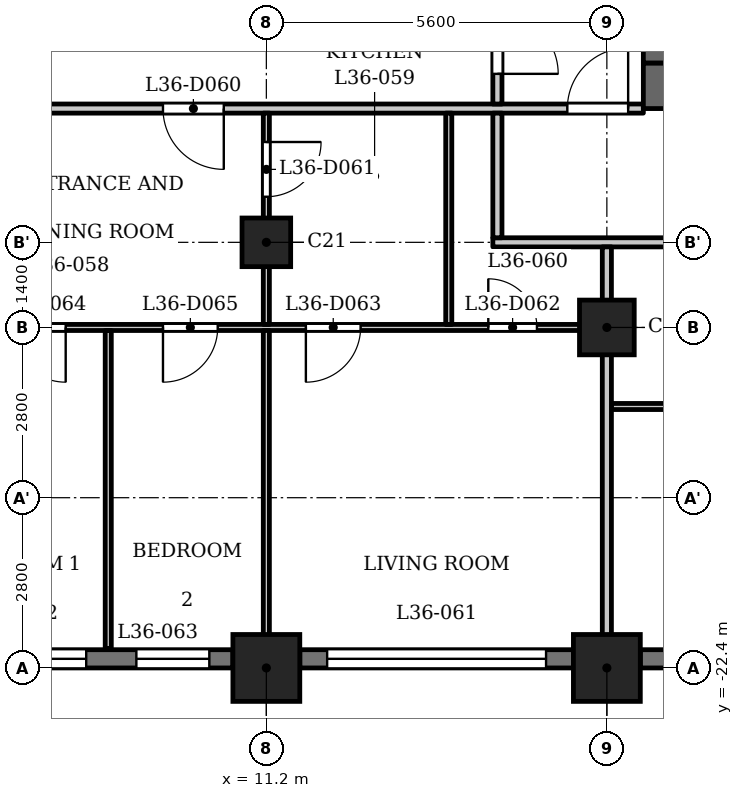
"""IFC4 building model, lengths in metres.
Left out: names, types, materials, properties, quantities, classifications, styles, units other than length and angle.
Written with IfcOpenShell. Run it as: python <this file> out.ifc"""

import sys

from ifc_helpers import new_model, si_unit, direction, frame, frame_2d, origin, origin_2d, place, context, subcontext, project, spatial, rectangle, extrude, element, fill, save


model = new_model("IFC4")
c1 = context("Model", 3, precision=1e-05, world=origin(), true_north=direction((0.0, 1.0)))
c2 = subcontext(c1, "Body", "Model", "MODEL_VIEW")
j1 = project(units=[si_unit("LENGTHUNIT", "METRE"), si_unit("PLANEANGLEUNIT", "RADIAN")], contexts=[c1])
p1 = place(None, origin())
s1 = spatial("IfcSite", under=j1, at=p1, CompositionType="ELEMENT")
p2 = place(p1, origin())
s2 = spatial("IfcBuilding", under=s1, at=p2, CompositionType="ELEMENT")
p3 = place(p2, frame((0.0, 0.0, 143.1)))
s3 = spatial("IfcBuildingStorey", under=s2, at=p3, CompositionType="ELEMENT", Elevation=143.1)
for number, where, z_axis, x_axis in (
    (1, (11.2, -22.4, 0.0), (0.0, 0.0, 1.0), (1.0, 0.0, 0.0)),
    (2, (16.8, -22.4, 0.0), (0.0, 0.0, 1.0), (1.0, 0.0, 0.0)),
):
    element("IfcColumn", number, at=place(p3, frame(where, z_axis=z_axis, x_axis=x_axis)), inside=s3, PredefinedType="COLUMN", context=c2, shape_type="SweptSolid", body=[
        extrude(rectangle(XDim=1.1, YDim=1.1, at=origin_2d()), origin(), (0.0, 0.0, 1.0), 3.5),
    ])
p4 = place(p3, frame((16.8, -16.8, 0.0), z_axis=(0.0, 0.0, 1.0), x_axis=(1.0, 0.0, 0.0)))
e3 = element("IfcColumn", 3, at=p4, inside=s3, PredefinedType="COLUMN", context=c2, shape_type="SweptSolid", body=[
    extrude(rectangle(XDim=0.9, YDim=0.9, at=origin_2d()), origin(), (0.0, 0.0, 1.0), 3.5),
])
p5 = place(p3, frame((11.2, -15.4, 0.0), z_axis=(0.0, 0.0, 1.0), x_axis=(1.0, 0.0, 0.0)))
e4 = element("IfcColumn", 4, at=p5, inside=s3, PredefinedType="COLUMN", context=c2, shape_type="SweptSolid", body=[
    extrude(rectangle(XDim=0.8, YDim=0.8, at=origin_2d()), origin(), (0.0, 0.0, 1.0), 3.5),
])
p6 = place(p3, frame((6.15, -22.25, 0.0), z_axis=(0.0, 0.0, 1.0), x_axis=(1.0, 0.0, 0.0)))
e5 = element("IfcWall", 5, at=p6, inside=s3, PredefinedType="SOLIDWALL", context=c2, shape_type="SweptSolid", body=[
    extrude(rectangle(XDim=4.5, YDim=0.3, at=frame_2d((2.25, 0.0))), origin(), (0.0, 0.0, 1.0), 2.45),
])
p7 = place(p6, frame((0.288, 0.0, 0.9)))
e6 = element("IfcOpeningElement", 6, at=p7, cuts=e5, PredefinedType="OPENING", context=c2, shape_type="SweptSolid", body=[
    extrude(rectangle(XDim=1.8, YDim=1.25, at=frame_2d((0.9, 0.625))), frame((0.0, 0.16, 0.0), z_axis=(0.0, -1.0, 0.0), x_axis=(1.0, 0.0, 0.0)), (0.0, 0.0, 1.0), 0.32),
])
p8 = place(p6, frame((2.913, 0.0, 0.6)))
e7 = element("IfcOpeningElement", 7, at=p8, cuts=e5, PredefinedType="OPENING", context=c2, shape_type="SweptSolid", body=[
    extrude(rectangle(XDim=1.2, YDim=1.55, at=frame_2d((0.6, 0.775))), frame((0.0, 0.16, 0.0), z_axis=(0.0, -1.0, 0.0), x_axis=(1.0, 0.0, 0.0)), (0.0, 0.0, 1.0), 0.32),
])
p9 = place(p3, frame((11.75, -22.25, 0.0), z_axis=(0.0, 0.0, 1.0), x_axis=(1.0, 0.0, 0.0)))
e8 = element("IfcWall", 8, at=p9, inside=s3, PredefinedType="SOLIDWALL", context=c2, shape_type="SweptSolid", body=[
    extrude(rectangle(XDim=4.5, YDim=0.3, at=frame_2d((2.25, 0.0))), origin(), (0.0, 0.0, 1.0), 2.45),
])
p10 = place(p9, frame((0.45, 0.0, 1.2)))
e9 = element("IfcOpeningElement", 9, at=p10, cuts=e8, PredefinedType="OPENING", context=c2, shape_type="SweptSolid", body=[
    extrude(rectangle(XDim=3.6, YDim=0.95, at=frame_2d((1.8, 0.475))), frame((0.0, 0.16, 0.0), z_axis=(0.0, -1.0, 0.0), x_axis=(1.0, 0.0, 0.0)), (0.0, 0.0, 1.0), 0.32),
])
p11 = place(p3, frame((17.35, -22.25, 0.0), z_axis=(0.0, 0.0, 1.0), x_axis=(1.0, 0.0, 0.0)))
e10 = element("IfcWall", 10, at=p11, inside=s3, PredefinedType="SOLIDWALL", context=c2, shape_type="SweptSolid", body=[
    extrude(rectangle(XDim=2.65, YDim=0.3, at=frame_2d((1.325, 0.0))), origin(), (0.0, 0.0, 1.0), 2.45),
])
p12 = place(p11, frame((0.425, 0.0, 0.9)))
e11 = element("IfcOpeningElement", 11, at=p12, cuts=e10, PredefinedType="OPENING", context=c2, shape_type="SweptSolid", body=[
    extrude(rectangle(XDim=1.8, YDim=1.25, at=frame_2d((0.9, 0.625))), frame((0.0, 0.16, 0.0), z_axis=(0.0, -1.0, 0.0), x_axis=(1.0, 0.0, 0.0)), (0.0, 0.0, 1.0), 0.32),
])
p13 = place(p3, frame((17.4, -12.825, 0.0), z_axis=(0.0, 0.0, 1.0), x_axis=(1.0, 0.0, 0.0)))
e12 = element("IfcWall", 12, at=p13, inside=s3, PredefinedType="SHEAR", context=c2, shape_type="SweptSolid", body=[
    extrude(rectangle(XDim=10.4, YDim=0.75, at=frame_2d((5.2, 0.0))), origin(), (0.0, 0.0, 1.0), 3.2),
])
p14 = place(p3, frame((17.6, -12.45, 0.0), z_axis=(0.0, 0.0, 1.0), x_axis=(0.0, 1.0, 0.0)))
e13 = element("IfcWall", 13, at=p14, inside=s3, PredefinedType="SHEAR", context=c2, shape_type="SweptSolid", body=[
    extrude(rectangle(XDim=24.9, YDim=0.4, at=frame_2d((12.45, 0.0))), origin(), (0.0, 0.0, 1.0), 3.2),
])
p15 = place(p14, frame((8.65, 0.0, 0.0)))
e14 = element("IfcOpeningElement", 14, at=p15, cuts=e13, PredefinedType="OPENING", context=c2, shape_type="SweptSolid", body=[
    extrude(rectangle(XDim=0.9, YDim=2.1, at=frame_2d((0.45, 1.05))), frame((0.0, 0.21, 0.0), z_axis=(0.0, -1.0, 0.0), x_axis=(1.0, 0.0, 0.0)), (0.0, 0.0, 1.0), 0.42),
])
p16 = place(p14, frame((15.6, 0.0, 0.0)))
e15 = element("IfcOpeningElement", 15, at=p16, cuts=e13, PredefinedType="OPENING", context=c2, shape_type="SweptSolid", body=[
    extrude(rectangle(XDim=1.1, YDim=2.1, at=frame_2d((0.55, 1.05))), frame((0.0, 0.21, 0.0), z_axis=(0.0, -1.0, 0.0), x_axis=(1.0, 0.0, 0.0)), (0.0, 0.0, 1.0), 0.42),
])
p17 = place(p14, frame((18.0, 0.0, 0.0)))
e16 = element("IfcOpeningElement", 16, at=p17, cuts=e13, PredefinedType="OPENING", context=c2, shape_type="SweptSolid", body=[
    extrude(rectangle(XDim=1.1, YDim=2.1, at=frame_2d((0.55, 1.05))), frame((0.0, 0.21, 0.0), z_axis=(0.0, -1.0, 0.0), x_axis=(1.0, 0.0, 0.0)), (0.0, 0.0, 1.0), 0.42),
])
p18 = place(p14, frame((23.025, 0.0, 0.0)))
e17 = element("IfcOpeningElement", 17, at=p18, cuts=e13, PredefinedType="OPENING", context=c2, shape_type="SweptSolid", body=[
    extrude(rectangle(XDim=1.1, YDim=2.1, at=frame_2d((0.55, 1.05))), frame((0.0, 0.21, 0.0), z_axis=(0.0, -1.0, 0.0), x_axis=(1.0, 0.0, 0.0)), (0.0, 0.0, 1.0), 0.42),
])
p19 = place(p14, frame((0.775, 0.0, 0.0)))
e18 = element("IfcOpeningElement", 18, at=p19, cuts=e13, PredefinedType="OPENING", context=c2, shape_type="SweptSolid", body=[
    extrude(rectangle(XDim=1.1, YDim=2.1, at=frame_2d((0.55, 1.05))), frame((0.0, 0.21, 0.0), z_axis=(0.0, -1.0, 0.0), x_axis=(1.0, 0.0, 0.0)), (0.0, 0.0, 1.0), 0.42),
])
p20 = place(p14, frame((12.925, 0.0, 0.0)))
e19 = element("IfcOpeningElement", 19, at=p20, cuts=e13, PredefinedType="OPENING", context=c2, shape_type="SweptSolid", body=[
    extrude(rectangle(XDim=1.8, YDim=2.1, at=frame_2d((0.9, 1.05))), frame((0.0, 0.21, 0.0), z_axis=(0.0, -1.0, 0.0), x_axis=(1.0, 0.0, 0.0)), (0.0, 0.0, 1.0), 0.42),
])
p21 = place(p3, frame((16.875, -18.1, 0.0), z_axis=(0.0, 0.0, 1.0), x_axis=(1.0, 0.0, 0.0)))
e20 = element("IfcWall", 20, at=p21, inside=s3, PredefinedType="PARTITIONING", context=c2, shape_type="SweptSolid", body=[
    extrude(rectangle(XDim=9.565, YDim=0.1, at=frame_2d((4.782, 0.0))), origin(), (0.0, 0.0, 1.0), 3.2),
])
p22 = place(p21, frame((7.639, 0.0, 0.0)))
e21 = element("IfcOpeningElement", 21, at=p22, cuts=e20, PredefinedType="OPENING", context=c2, shape_type="SweptSolid", body=[
    extrude(rectangle(XDim=0.8, YDim=2.1, at=frame_2d((0.4, 1.05))), frame((0.0, 0.06, 0.0), z_axis=(0.0, -1.0, 0.0), x_axis=(1.0, 0.0, 0.0)), (0.0, 0.0, 1.0), 0.12),
])
p23 = place(p21, frame((4.075, 0.0, 0.0)))
e22 = element("IfcOpeningElement", 22, at=p23, cuts=e20, PredefinedType="OPENING", context=c2, shape_type="SweptSolid", body=[
    extrude(rectangle(XDim=0.9, YDim=2.1, at=frame_2d((0.45, 1.05))), frame((0.0, 0.06, 0.0), z_axis=(0.0, -1.0, 0.0), x_axis=(1.0, 0.0, 0.0)), (0.0, 0.0, 1.0), 0.12),
])
p24 = place(p3, frame((-16.725, -16.8, 0.0), z_axis=(0.0, 0.0, 1.0), x_axis=(1.0, 0.0, 0.0)))
e23 = element("IfcWall", 23, at=p24, inside=s3, PredefinedType="PARTITIONING", context=c2, shape_type="SweptSolid", body=[
    extrude(rectangle(XDim=33.45, YDim=0.1, at=frame_2d((16.725, 0.0))), origin(), (0.0, 0.0, 1.0), 3.2),
])
p25 = place(p24, frame((0.575, 0.0, 0.0)))
e24 = element("IfcOpeningElement", 24, at=p25, cuts=e23, PredefinedType="OPENING", context=c2, shape_type="SweptSolid", body=[
    extrude(rectangle(XDim=0.8, YDim=2.1, at=frame_2d((0.4, 1.05))), frame((0.0, 0.06, 0.0), z_axis=(0.0, -1.0, 0.0), x_axis=(1.0, 0.0, 0.0)), (0.0, 0.0, 1.0), 0.12),
])
p26 = place(p24, frame((6.175, 0.0, 0.0)))
e25 = element("IfcOpeningElement", 25, at=p26, cuts=e23, PredefinedType="OPENING", context=c2, shape_type="SweptSolid", body=[
    extrude(rectangle(XDim=0.9, YDim=2.1, at=frame_2d((0.45, 1.05))), frame((0.0, 0.06, 0.0), z_axis=(0.0, -1.0, 0.0), x_axis=(1.0, 0.0, 0.0)), (0.0, 0.0, 1.0), 0.12),
])
p27 = place(p24, frame((15.275, 0.0, 0.0)))
e26 = element("IfcOpeningElement", 26, at=p27, cuts=e23, PredefinedType="OPENING", context=c2, shape_type="SweptSolid", body=[
    extrude(rectangle(XDim=0.8, YDim=2.1, at=frame_2d((0.4, 1.05))), frame((0.0, 0.06, 0.0), z_axis=(0.0, -1.0, 0.0), x_axis=(1.0, 0.0, 0.0)), (0.0, 0.0, 1.0), 0.12),
])
p28 = place(p24, frame((11.775, 0.0, 0.0)))
e27 = element("IfcOpeningElement", 27, at=p28, cuts=e23, PredefinedType="OPENING", context=c2, shape_type="SweptSolid", body=[
    extrude(rectangle(XDim=0.9, YDim=2.1, at=frame_2d((0.45, 1.05))), frame((0.0, 0.06, 0.0), z_axis=(0.0, -1.0, 0.0), x_axis=(1.0, 0.0, 0.0)), (0.0, 0.0, 1.0), 0.12),
])
p29 = place(p24, frame((17.275, 0.0, 0.0)))
e28 = element("IfcOpeningElement", 28, at=p29, cuts=e23, PredefinedType="OPENING", context=c2, shape_type="SweptSolid", body=[
    extrude(rectangle(XDim=0.8, YDim=2.1, at=frame_2d((0.4, 1.05))), frame((0.0, 0.06, 0.0), z_axis=(0.0, -1.0, 0.0), x_axis=(1.0, 0.0, 0.0)), (0.0, 0.0, 1.0), 0.12),
])
p30 = place(p24, frame((20.775, 0.0, 0.0)))
e29 = element("IfcOpeningElement", 29, at=p30, cuts=e23, PredefinedType="OPENING", context=c2, shape_type="SweptSolid", body=[
    extrude(rectangle(XDim=0.9, YDim=2.1, at=frame_2d((0.45, 1.05))), frame((0.0, 0.06, 0.0), z_axis=(0.0, -1.0, 0.0), x_axis=(1.0, 0.0, 0.0)), (0.0, 0.0, 1.0), 0.12),
])
p31 = place(p24, frame((31.575, 0.0, 0.0)))
e30 = element("IfcOpeningElement", 30, at=p31, cuts=e23, PredefinedType="OPENING", context=c2, shape_type="SweptSolid", body=[
    extrude(rectangle(XDim=0.8, YDim=2.1, at=frame_2d((0.4, 1.05))), frame((0.0, 0.06, 0.0), z_axis=(0.0, -1.0, 0.0), x_axis=(1.0, 0.0, 0.0)), (0.0, 0.0, 1.0), 0.12),
])
p32 = place(p24, frame((28.575, 0.0, 0.0)))
e31 = element("IfcOpeningElement", 31, at=p32, cuts=e23, PredefinedType="OPENING", context=c2, shape_type="SweptSolid", body=[
    extrude(rectangle(XDim=0.9, YDim=2.1, at=frame_2d((0.45, 1.05))), frame((0.0, 0.06, 0.0), z_axis=(0.0, -1.0, 0.0), x_axis=(1.0, 0.0, 0.0)), (0.0, 0.0, 1.0), 0.12),
])
p33 = place(p24, frame((23.725, 0.0, 0.0)))
e32 = element("IfcOpeningElement", 32, at=p33, cuts=e23, PredefinedType="OPENING", context=c2, shape_type="SweptSolid", body=[
    extrude(rectangle(XDim=0.9, YDim=2.1, at=frame_2d((0.45, 1.05))), frame((0.0, 0.06, 0.0), z_axis=(0.0, -1.0, 0.0), x_axis=(1.0, 0.0, 0.0)), (0.0, 0.0, 1.0), 0.12),
])
p34 = place(p24, frame((26.225, 0.0, 0.0)))
e33 = element("IfcOpeningElement", 33, at=p34, cuts=e23, PredefinedType="OPENING", context=c2, shape_type="SweptSolid", body=[
    extrude(rectangle(XDim=0.9, YDim=2.1, at=frame_2d((0.45, 1.05))), frame((0.0, 0.06, 0.0), z_axis=(0.0, -1.0, 0.0), x_axis=(1.0, 0.0, 0.0)), (0.0, 0.0, 1.0), 0.12),
])
p35 = place(p3, frame((14.925, -15.4, 0.0), z_axis=(0.0, 0.0, 1.0), x_axis=(1.0, 0.0, 0.0)))
e34 = element("IfcWall", 34, at=p35, inside=s3, PredefinedType="PARTITIONING", context=c2, shape_type="SweptSolid", body=[
    extrude(rectangle(XDim=12.559, YDim=0.15, at=frame_2d((6.279, 0.0))), origin(), (0.0, 0.0, 1.0), 3.2),
])
p36 = place(p35, frame((5.775, 0.0, 0.0)))
e35 = element("IfcOpeningElement", 35, at=p36, cuts=e34, PredefinedType="OPENING", context=c2, shape_type="SweptSolid", body=[
    extrude(rectangle(XDim=1.0, YDim=2.1, at=frame_2d((0.5, 1.05))), frame((0.0, 0.085, 0.0), z_axis=(0.0, -1.0, 0.0), x_axis=(1.0, 0.0, 0.0)), (0.0, 0.0, 1.0), 0.17),
])
p37 = place(p3, frame((-17.4, -13.2, 0.0), z_axis=(0.0, 0.0, 1.0), x_axis=(1.0, 0.0, 0.0)))
e36 = element("IfcWall", 36, at=p37, inside=s3, PredefinedType="PARTITIONING", context=c2, shape_type="SweptSolid", body=[
    extrude(rectangle(XDim=34.8, YDim=0.15, at=frame_2d((17.4, 0.0))), origin(), (0.0, 0.0, 1.0), 3.2),
])
p38 = place(p37, frame((0.15, 0.0, 0.0)))
e37 = element("IfcOpeningElement", 37, at=p38, cuts=e36, PredefinedType="OPENING", context=c2, shape_type="SweptSolid", body=[
    extrude(rectangle(XDim=1.0, YDim=2.1, at=frame_2d((0.5, 1.05))), frame((0.0, 0.085, 0.0), z_axis=(0.0, -1.0, 0.0), x_axis=(1.0, 0.0, 0.0)), (0.0, 0.0, 1.0), 0.17),
])
p39 = place(p37, frame((33.55, 0.0, 0.0)))
e38 = element("IfcOpeningElement", 38, at=p39, cuts=e36, PredefinedType="OPENING", context=c2, shape_type="SweptSolid", body=[
    extrude(rectangle(XDim=1.0, YDim=2.1, at=frame_2d((0.5, 1.05))), frame((0.0, 0.085, 0.0), z_axis=(0.0, -1.0, 0.0), x_axis=(1.0, 0.0, 0.0)), (0.0, 0.0, 1.0), 0.17),
])
p40 = place(p37, frame((6.85, 0.0, 0.0)))
e39 = element("IfcOpeningElement", 39, at=p40, cuts=e36, PredefinedType="OPENING", context=c2, shape_type="SweptSolid", body=[
    extrude(rectangle(XDim=1.0, YDim=2.1, at=frame_2d((0.5, 1.05))), frame((0.0, 0.085, 0.0), z_axis=(0.0, -1.0, 0.0), x_axis=(1.0, 0.0, 0.0)), (0.0, 0.0, 1.0), 0.17),
])
p41 = place(p37, frame((12.45, 0.0, 0.0)))
e40 = element("IfcOpeningElement", 40, at=p41, cuts=e36, PredefinedType="OPENING", context=c2, shape_type="SweptSolid", body=[
    extrude(rectangle(XDim=1.0, YDim=2.1, at=frame_2d((0.5, 1.05))), frame((0.0, 0.085, 0.0), z_axis=(0.0, -1.0, 0.0), x_axis=(1.0, 0.0, 0.0)), (0.0, 0.0, 1.0), 0.17),
])
p42 = place(p37, frame((21.3, 0.0, 0.0)))
e41 = element("IfcOpeningElement", 41, at=p42, cuts=e36, PredefinedType="OPENING", context=c2, shape_type="SweptSolid", body=[
    extrude(rectangle(XDim=1.0, YDim=2.1, at=frame_2d((0.5, 1.05))), frame((0.0, 0.085, 0.0), z_axis=(0.0, -1.0, 0.0), x_axis=(1.0, 0.0, 0.0)), (0.0, 0.0, 1.0), 0.17),
])
p43 = place(p37, frame((26.9, 0.0, 0.0)))
e42 = element("IfcOpeningElement", 42, at=p43, cuts=e36, PredefinedType="OPENING", context=c2, shape_type="SweptSolid", body=[
    extrude(rectangle(XDim=1.0, YDim=2.1, at=frame_2d((0.5, 1.05))), frame((0.0, 0.085, 0.0), z_axis=(0.0, -1.0, 0.0), x_axis=(1.0, 0.0, 0.0)), (0.0, 0.0, 1.0), 0.17),
])
p44 = place(p3, frame((8.6, -22.08, 0.0), z_axis=(0.0, 0.0, 1.0), x_axis=(0.0, 1.0, 0.0)))
e43 = element("IfcWall", 43, at=p44, inside=s3, PredefinedType="PARTITIONING", context=c2, shape_type="SweptSolid", body=[
    extrude(rectangle(XDim=5.23, YDim=0.1, at=frame_2d((2.615, 0.0))), origin(), (0.0, 0.0, 1.0), 3.2),
])
p45 = place(p3, frame((11.2, -22.93, 0.0), z_axis=(0.0, 0.0, 1.0), x_axis=(0.0, 1.0, 0.0)))
e44 = element("IfcWall", 44, at=p45, inside=s3, PredefinedType="PARTITIONING", context=c2, shape_type="SweptSolid", body=[
    extrude(rectangle(XDim=6.08, YDim=0.1, at=frame_2d((3.04, 0.0))), origin(), (0.0, 0.0, 1.0), 3.2),
])
p46 = place(p3, frame((11.2, -16.75, 0.0), z_axis=(0.0, 0.0, 1.0), x_axis=(0.0, 1.0, 0.0)))
e45 = element("IfcWall", 45, at=p46, inside=s3, PredefinedType="PARTITIONING", context=c2, shape_type="SweptSolid", body=[
    extrude(rectangle(XDim=3.475, YDim=0.1, at=frame_2d((1.738, 0.0))), origin(), (0.0, 0.0, 1.0), 3.2),
])
p47 = place(p46, frame((2.1, 0.0, 0.0)))
e46 = element("IfcOpeningElement", 46, at=p47, cuts=e45, PredefinedType="OPENING", context=c2, shape_type="SweptSolid", body=[
    extrude(rectangle(XDim=0.9, YDim=2.1, at=frame_2d((0.45, 1.05))), frame((0.0, 0.06, 0.0), z_axis=(0.0, -1.0, 0.0), x_axis=(1.0, 0.0, 0.0)), (0.0, 0.0, 1.0), 0.12),
])
p48 = place(p3, frame((14.2, -16.75, 0.0), z_axis=(0.0, 0.0, 1.0), x_axis=(0.0, 1.0, 0.0)))
e47 = element("IfcWall", 47, at=p48, inside=s3, PredefinedType="PARTITIONING", context=c2, shape_type="SweptSolid", body=[
    extrude(rectangle(XDim=3.475, YDim=0.1, at=frame_2d((1.738, 0.0))), origin(), (0.0, 0.0, 1.0), 3.2),
])
p49 = place(p3, frame((15.0, -15.325, 0.0), z_axis=(0.0, 0.0, 1.0), x_axis=(0.0, 1.0, 0.0)))
e48 = element("IfcWall", 48, at=p49, inside=s3, PredefinedType="PARTITIONING", context=c2, shape_type="SweptSolid", body=[
    extrude(rectangle(XDim=2.05, YDim=0.15, at=frame_2d((1.025, 0.0))), origin(), (0.0, 0.0, 1.0), 3.2),
])
p50 = place(p3, frame((15.0, -13.125, 0.0), z_axis=(0.0, 0.0, 1.0), x_axis=(0.0, 1.0, 0.0)))
e49 = element("IfcWall", 49, at=p50, inside=s3, PredefinedType="PARTITIONING", context=c2, shape_type="SweptSolid", body=[
    extrude(rectangle(XDim=6.356, YDim=0.15, at=frame_2d((3.178, 0.0))), origin(), (0.0, 0.0, 1.0), 3.2),
])
p51 = place(p50, frame((0.496, 0.0, 0.0)))
e50 = element("IfcOpeningElement", 50, at=p51, cuts=e49, PredefinedType="OPENING", context=c2, shape_type="SweptSolid", body=[
    extrude(rectangle(XDim=1.0, YDim=2.1, at=frame_2d((0.5, 1.05))), frame((0.0, 0.085, 0.0), z_axis=(0.0, -1.0, 0.0), x_axis=(1.0, 0.0, 0.0)), (0.0, 0.0, 1.0), 0.17),
])
p52 = place(p3, frame((16.8, -22.93, 0.0), z_axis=(0.0, 0.0, 1.0), x_axis=(0.0, 1.0, 0.0)))
e51 = element("IfcWall", 51, at=p52, inside=s3, PredefinedType="PARTITIONING", context=c2, shape_type="SweptSolid", body=[
    extrude(rectangle(XDim=7.455, YDim=0.15, at=frame_2d((3.728, 0.0))), origin(), (0.0, 0.0, 1.0), 3.2),
])
p53 = place(p51, origin())
e52 = element("IfcDoor", 52, at=p53, inside=s3, OperationType="SINGLE_SWING_LEFT", PredefinedType="DOOR", context=c2, shape_type="SweptSolid", body=[
    extrude(rectangle(XDim=1.0, YDim=2.1, at=frame_2d((0.5, 1.05))), frame((0.0, 0.025, 0.0), z_axis=(0.0, -1.0, 0.0), x_axis=(1.0, 0.0, 0.0)), (0.0, 0.0, 1.0), 0.05),
])
fill(e50, e52)
p54 = place(p39, origin())
e53 = element("IfcDoor", 53, at=p54, inside=s3, OperationType="SINGLE_SWING_LEFT", PredefinedType="DOOR", context=c2, shape_type="SweptSolid", body=[
    extrude(rectangle(XDim=1.0, YDim=2.1, at=frame_2d((0.5, 1.05))), frame((0.0, 0.025, 0.0), z_axis=(0.0, -1.0, 0.0), x_axis=(1.0, 0.0, 0.0)), (0.0, 0.0, 1.0), 0.05),
])
fill(e38, e53)
p55 = place(p43, origin())
e54 = element("IfcDoor", 54, at=p55, inside=s3, OperationType="SINGLE_SWING_RIGHT", PredefinedType="DOOR", context=c2, shape_type="SweptSolid", body=[
    extrude(rectangle(XDim=1.0, YDim=2.1, at=frame_2d((0.5, 1.05))), frame((0.0, 0.025, 0.0), z_axis=(0.0, -1.0, 0.0), x_axis=(1.0, 0.0, 0.0)), (0.0, 0.0, 1.0), 0.05),
])
fill(e42, e54)
p56 = place(p47, origin())
e55 = element("IfcDoor", 55, at=p56, inside=s3, OperationType="SINGLE_SWING_RIGHT", PredefinedType="DOOR", context=c2, shape_type="SweptSolid", body=[
    extrude(rectangle(XDim=0.9, YDim=2.1, at=frame_2d((0.45, 1.05))), frame((0.0, 0.025, 0.0), z_axis=(0.0, -1.0, 0.0), x_axis=(1.0, 0.0, 0.0)), (0.0, 0.0, 1.0), 0.05),
])
fill(e46, e55)
p57 = place(p31, origin())
e56 = element("IfcDoor", 56, at=p57, inside=s3, OperationType="SINGLE_SWING_RIGHT", PredefinedType="DOOR", context=c2, shape_type="SweptSolid", body=[
    extrude(rectangle(XDim=0.8, YDim=2.1, at=frame_2d((0.4, 1.05))), frame((0.0, 0.025, 0.0), z_axis=(0.0, -1.0, 0.0), x_axis=(1.0, 0.0, 0.0)), (0.0, 0.0, 1.0), 0.05),
])
fill(e30, e56)
p58 = place(p32, origin())
e57 = element("IfcDoor", 57, at=p58, inside=s3, OperationType="SINGLE_SWING_LEFT", PredefinedType="DOOR", context=c2, shape_type="SweptSolid", body=[
    extrude(rectangle(XDim=0.9, YDim=2.1, at=frame_2d((0.45, 1.05))), frame((0.0, 0.025, 0.0), z_axis=(0.0, -1.0, 0.0), x_axis=(1.0, 0.0, 0.0)), (0.0, 0.0, 1.0), 0.05),
])
fill(e31, e57)
p59 = place(p33, origin())
e58 = element("IfcDoor", 58, at=p59, inside=s3, OperationType="SINGLE_SWING_RIGHT", PredefinedType="DOOR", context=c2, shape_type="SweptSolid", body=[
    extrude(rectangle(XDim=0.9, YDim=2.1, at=frame_2d((0.45, 1.05))), frame((0.0, 0.025, 0.0), z_axis=(0.0, -1.0, 0.0), x_axis=(1.0, 0.0, 0.0)), (0.0, 0.0, 1.0), 0.05),
])
fill(e32, e58)
p60 = place(p34, origin())
e59 = element("IfcDoor", 59, at=p60, inside=s3, OperationType="SINGLE_SWING_LEFT", PredefinedType="DOOR", context=c2, shape_type="SweptSolid", body=[
    extrude(rectangle(XDim=0.9, YDim=2.1, at=frame_2d((0.45, 1.05))), frame((0.0, 0.025, 0.0), z_axis=(0.0, -1.0, 0.0), x_axis=(1.0, 0.0, 0.0)), (0.0, 0.0, 1.0), 0.05),
])
fill(e33, e59)
p61 = place(p7, origin())
e60 = element("IfcWindow", 60, at=p61, inside=s3, PartitioningType="SINGLE_PANEL", PredefinedType="WINDOW", context=c2, shape_type="SweptSolid", body=[
    extrude(rectangle(XDim=1.8, YDim=1.25, at=frame_2d((0.9, 0.625))), frame((0.0, 0.03, 0.0), z_axis=(0.0, -1.0, 0.0), x_axis=(1.0, 0.0, 0.0)), (0.0, 0.0, 1.0), 0.06),
])
fill(e6, e60)
p62 = place(p8, origin())
e61 = element("IfcWindow", 61, at=p62, inside=s3, PartitioningType="SINGLE_PANEL", PredefinedType="WINDOW", context=c2, shape_type="SweptSolid", body=[
    extrude(rectangle(XDim=1.2, YDim=1.55, at=frame_2d((0.6, 0.775))), frame((0.0, 0.03, 0.0), z_axis=(0.0, -1.0, 0.0), x_axis=(1.0, 0.0, 0.0)), (0.0, 0.0, 1.0), 0.06),
])
fill(e7, e61)
p63 = place(p10, origin())
e62 = element("IfcWindow", 62, at=p63, inside=s3, PartitioningType="SINGLE_PANEL", PredefinedType="WINDOW", context=c2, shape_type="SweptSolid", body=[
    extrude(rectangle(XDim=3.6, YDim=0.95, at=frame_2d((1.8, 0.475))), frame((0.0, 0.03, 0.0), z_axis=(0.0, -1.0, 0.0), x_axis=(1.0, 0.0, 0.0)), (0.0, 0.0, 1.0), 0.06),
])
fill(e9, e62)
save(model, sys.argv[1])
